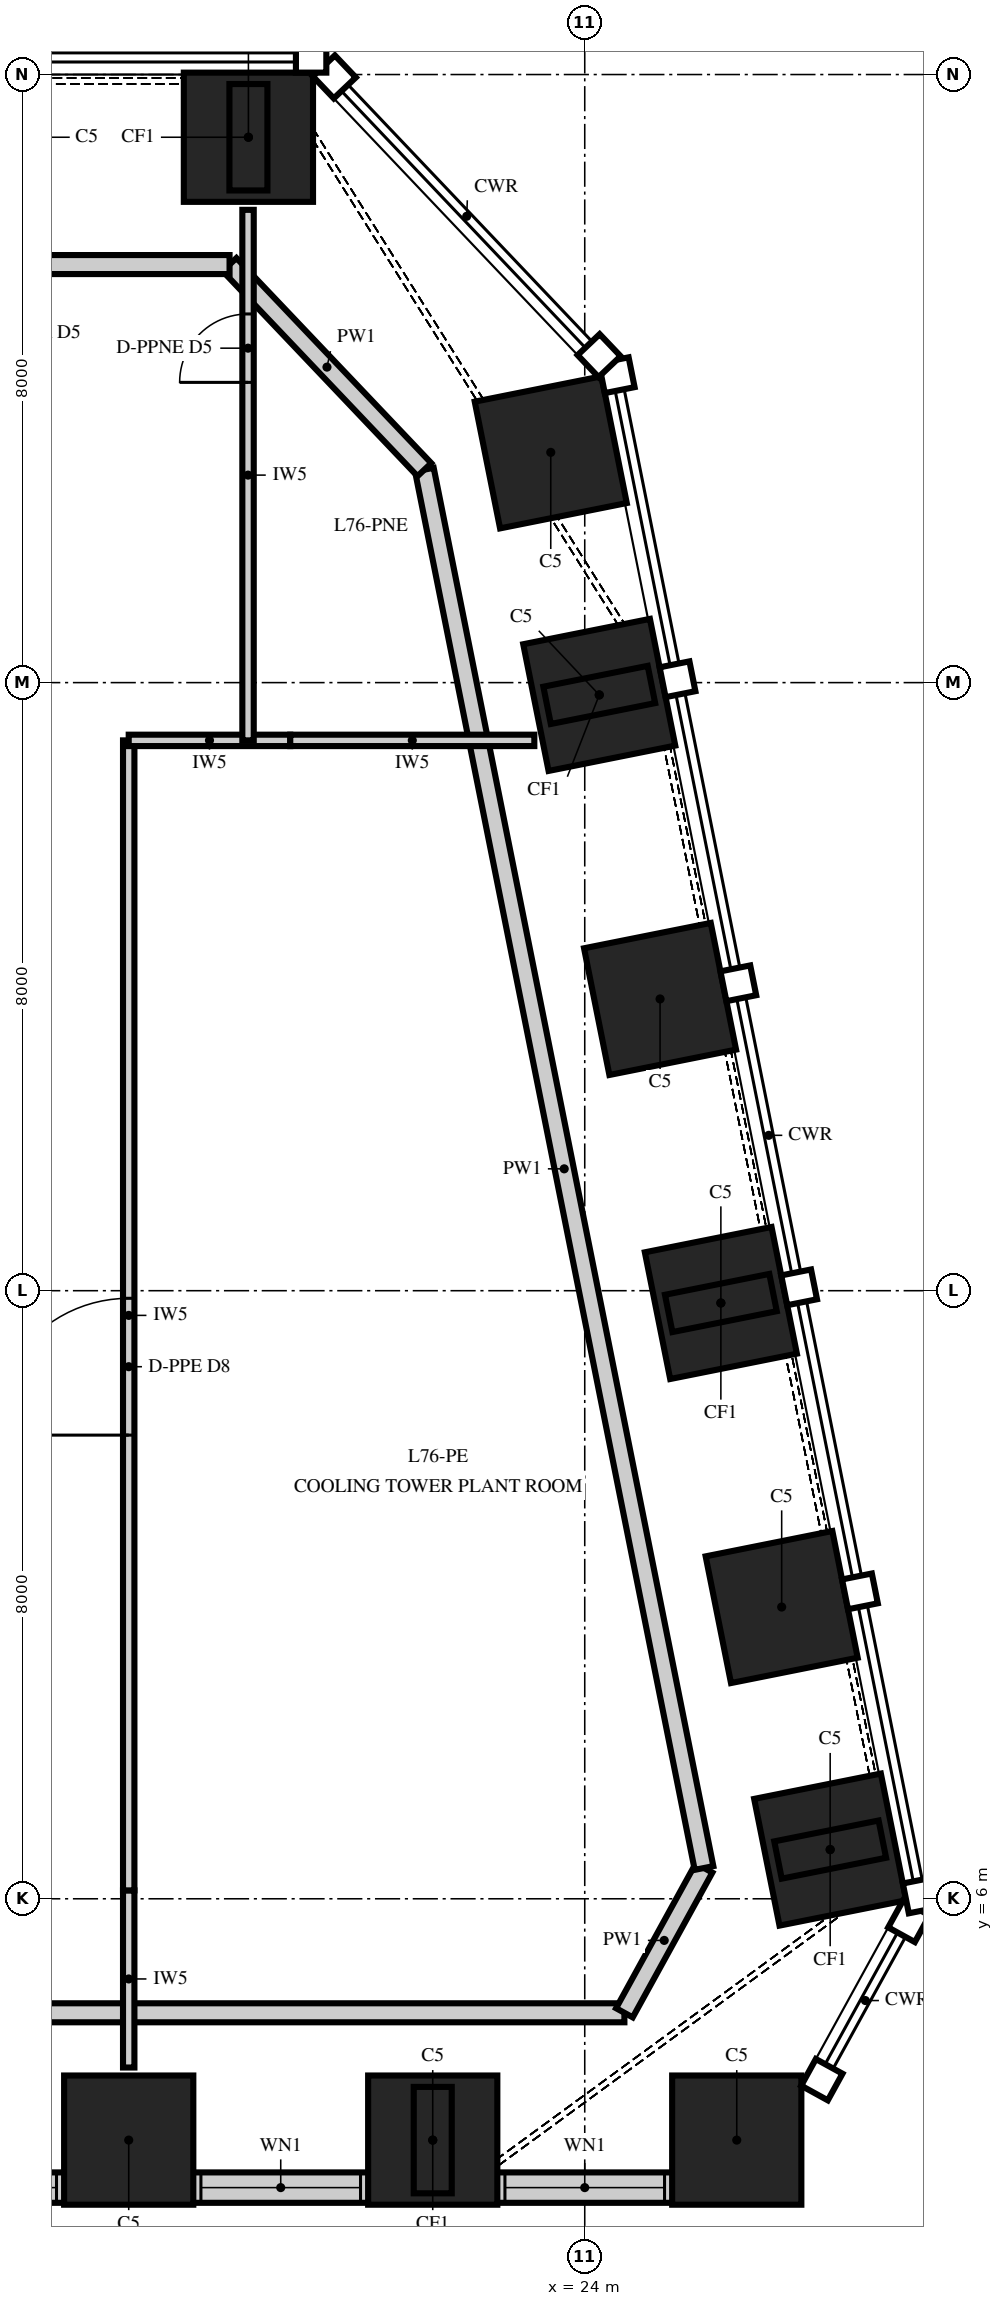
"""IFC4 building model, lengths in metres.
Left out: names, types, materials, properties, quantities, classifications, styles, units other than length and angle.
Written with IfcOpenShell. Run it as: python <this file> out.ifc"""

import sys

from ifc_helpers import new_model, si_unit, direction, frame, frame_2d, origin, origin_2d, place, context, subcontext, project, spatial, rectangle, hollow_rectangle, extrude, element, fill, save


model = new_model("IFC4")
c1 = context("Model", 3, precision=1e-05, world=origin(), true_north=direction((0.0, 1.0)))
c2 = subcontext(c1, "Body", "Model", "MODEL_VIEW")
j1 = project(units=[si_unit("LENGTHUNIT", "METRE"), si_unit("PLANEANGLEUNIT", "RADIAN")], contexts=[c1])
p1 = place(None, origin())
s1 = spatial("IfcSite", under=j1, at=p1, CompositionType="ELEMENT")
p2 = place(p1, origin())
s2 = spatial("IfcBuilding", under=s1, at=p2, CompositionType="ELEMENT")
p3 = place(p2, frame((0.0, 0.0, 324.0)))
s3 = spatial("IfcBuildingStorey", under=s2, at=p3, CompositionType="ELEMENT", Elevation=324.0)
for number, where, z_axis, x_axis in (
    (1, (18.0, 2.825, 0.0), (0.0, 0.0, 1.0), (1.0, 0.0, 0.0)),
    (2, (22.0, 2.825, 0.0), (0.0, 0.0, 1.0), (1.0, 0.0, 0.0)),
    (3, (26.0, 2.825, 0.0), (0.0, 0.0, 1.0), (1.0, 0.0, 0.0)),
    (4, (27.229, 6.647, 0.0), (0.0, 0.0, 1.0), (-0.196, 0.981, 0.0)),
    (5, (26.591, 9.838, 0.0), (0.0, 0.0, 1.0), (-0.196, 0.981, 0.0)),
    (6, (25.791, 13.838, 0.0), (0.0, 0.0, 1.0), (-0.196, 0.981, 0.0)),
    (7, (24.991, 17.838, 0.0), (0.0, 0.0, 1.0), (-0.196, 0.981, 0.0)),
    (8, (24.191, 21.838, 0.0), (0.0, 0.0, 1.0), (-0.196, 0.981, 0.0)),
    (9, (23.553, 25.029, 0.0), (0.0, 0.0, 1.0), (-0.196, 0.981, 0.0)),
    (10, (19.575, 29.175, 0.0), (0.0, 0.0, 1.0), (-1.0, 0.0, 0.0)),
):
    element("IfcColumn", number, at=place(p3, frame(where, z_axis=z_axis, x_axis=x_axis)), inside=s3, PredefinedType="COLUMN", context=c2, shape_type="SweptSolid", body=[
        extrude(rectangle(XDim=1.7, YDim=1.7, at=origin_2d()), origin(), (0.0, 0.0, 1.0), 6.0),
    ])
for number, where, z_axis, x_axis in (
    (11, (22.0, 2.825, 6.0), (0.0, 0.0, 1.0), (1.0, 0.0, 0.0)),
    (12, (27.229, 6.647, 6.0), (0.0, 0.0, 1.0), (-0.196, 0.981, 0.0)),
    (13, (25.791, 13.838, 6.0), (0.0, 0.0, 1.0), (-0.196, 0.981, 0.0)),
    (14, (24.191, 21.838, 6.0), (0.0, 0.0, 1.0), (-0.196, 0.981, 0.0)),
    (15, (19.575, 29.175, 6.0), (0.0, 0.0, 1.0), (-1.0, 0.0, 0.0)),
):
    element("IfcColumn", number, at=place(p3, frame(where, z_axis=z_axis, x_axis=x_axis)), inside=s3, PredefinedType="COLUMN", context=c2, shape_type="SweptSolid", body=[
        extrude(hollow_rectangle(XDim=0.5, YDim=1.4, WallThickness=0.04, at=origin_2d()), origin(), (0.0, 0.0, 1.0), 24.0),
    ])
p4 = place(p3, frame((-26.0, 2.2, 0.0), z_axis=(0.0, 0.0, 1.0), x_axis=(1.0, 0.0, 0.0)))
e16 = element("IfcWall", 16, at=p4, inside=s3, PredefinedType="SOLIDWALL", context=c2, shape_type="SweptSolid", body=[
    extrude(rectangle(XDim=52.0, YDim=0.4, at=frame_2d((26.0, 0.0))), origin(), (0.0, 0.0, 1.0), 4.0),
])
p5 = place(p4, frame((0.95, 0.0, 0.8)))
e17 = element("IfcOpeningElement", 17, at=p5, cuts=e16, PredefinedType="OPENING", context=c2, shape_type="SweptSolid", body=[
    extrude(rectangle(XDim=2.1, YDim=1.15, at=frame_2d((1.05, 0.575))), frame((0.0, 0.215, 0.0), z_axis=(0.0, -1.0, 0.0), x_axis=(1.0, 0.0, 0.0)), (0.0, 0.0, 1.0), 0.43),
])
p6 = place(p4, frame((4.95, 0.0, 0.8)))
e18 = element("IfcOpeningElement", 18, at=p6, cuts=e16, PredefinedType="OPENING", context=c2, shape_type="SweptSolid", body=[
    extrude(rectangle(XDim=2.1, YDim=1.15, at=frame_2d((1.05, 0.575))), frame((0.0, 0.215, 0.0), z_axis=(0.0, -1.0, 0.0), x_axis=(1.0, 0.0, 0.0)), (0.0, 0.0, 1.0), 0.43),
])
p7 = place(p4, frame((8.95, 0.0, 0.8)))
e19 = element("IfcOpeningElement", 19, at=p7, cuts=e16, PredefinedType="OPENING", context=c2, shape_type="SweptSolid", body=[
    extrude(rectangle(XDim=2.1, YDim=1.15, at=frame_2d((1.05, 0.575))), frame((0.0, 0.215, 0.0), z_axis=(0.0, -1.0, 0.0), x_axis=(1.0, 0.0, 0.0)), (0.0, 0.0, 1.0), 0.43),
])
p8 = place(p4, frame((12.95, 0.0, 0.8)))
e20 = element("IfcOpeningElement", 20, at=p8, cuts=e16, PredefinedType="OPENING", context=c2, shape_type="SweptSolid", body=[
    extrude(rectangle(XDim=2.1, YDim=1.15, at=frame_2d((1.05, 0.575))), frame((0.0, 0.215, 0.0), z_axis=(0.0, -1.0, 0.0), x_axis=(1.0, 0.0, 0.0)), (0.0, 0.0, 1.0), 0.43),
])
p9 = place(p4, frame((16.95, 0.0, 0.8)))
e21 = element("IfcOpeningElement", 21, at=p9, cuts=e16, PredefinedType="OPENING", context=c2, shape_type="SweptSolid", body=[
    extrude(rectangle(XDim=2.1, YDim=1.15, at=frame_2d((1.05, 0.575))), frame((0.0, 0.215, 0.0), z_axis=(0.0, -1.0, 0.0), x_axis=(1.0, 0.0, 0.0)), (0.0, 0.0, 1.0), 0.43),
])
p10 = place(p4, frame((20.95, 0.0, 0.8)))
e22 = element("IfcOpeningElement", 22, at=p10, cuts=e16, PredefinedType="OPENING", context=c2, shape_type="SweptSolid", body=[
    extrude(rectangle(XDim=2.1, YDim=1.15, at=frame_2d((1.05, 0.575))), frame((0.0, 0.215, 0.0), z_axis=(0.0, -1.0, 0.0), x_axis=(1.0, 0.0, 0.0)), (0.0, 0.0, 1.0), 0.43),
])
p11 = place(p4, frame((24.95, 0.0, 0.8)))
e23 = element("IfcOpeningElement", 23, at=p11, cuts=e16, PredefinedType="OPENING", context=c2, shape_type="SweptSolid", body=[
    extrude(rectangle(XDim=2.1, YDim=1.15, at=frame_2d((1.05, 0.575))), frame((0.0, 0.215, 0.0), z_axis=(0.0, -1.0, 0.0), x_axis=(1.0, 0.0, 0.0)), (0.0, 0.0, 1.0), 0.43),
])
p12 = place(p4, frame((28.95, 0.0, 0.8)))
e24 = element("IfcOpeningElement", 24, at=p12, cuts=e16, PredefinedType="OPENING", context=c2, shape_type="SweptSolid", body=[
    extrude(rectangle(XDim=2.1, YDim=1.15, at=frame_2d((1.05, 0.575))), frame((0.0, 0.215, 0.0), z_axis=(0.0, -1.0, 0.0), x_axis=(1.0, 0.0, 0.0)), (0.0, 0.0, 1.0), 0.43),
])
p13 = place(p4, frame((32.95, 0.0, 0.8)))
e25 = element("IfcOpeningElement", 25, at=p13, cuts=e16, PredefinedType="OPENING", context=c2, shape_type="SweptSolid", body=[
    extrude(rectangle(XDim=2.1, YDim=1.15, at=frame_2d((1.05, 0.575))), frame((0.0, 0.215, 0.0), z_axis=(0.0, -1.0, 0.0), x_axis=(1.0, 0.0, 0.0)), (0.0, 0.0, 1.0), 0.43),
])
p14 = place(p4, frame((36.95, 0.0, 0.8)))
e26 = element("IfcOpeningElement", 26, at=p14, cuts=e16, PredefinedType="OPENING", context=c2, shape_type="SweptSolid", body=[
    extrude(rectangle(XDim=2.1, YDim=1.15, at=frame_2d((1.05, 0.575))), frame((0.0, 0.215, 0.0), z_axis=(0.0, -1.0, 0.0), x_axis=(1.0, 0.0, 0.0)), (0.0, 0.0, 1.0), 0.43),
])
p15 = place(p4, frame((40.95, 0.0, 0.8)))
e27 = element("IfcOpeningElement", 27, at=p15, cuts=e16, PredefinedType="OPENING", context=c2, shape_type="SweptSolid", body=[
    extrude(rectangle(XDim=2.1, YDim=1.15, at=frame_2d((1.05, 0.575))), frame((0.0, 0.215, 0.0), z_axis=(0.0, -1.0, 0.0), x_axis=(1.0, 0.0, 0.0)), (0.0, 0.0, 1.0), 0.43),
])
p16 = place(p4, frame((44.95, 0.0, 0.8)))
e28 = element("IfcOpeningElement", 28, at=p16, cuts=e16, PredefinedType="OPENING", context=c2, shape_type="SweptSolid", body=[
    extrude(rectangle(XDim=2.1, YDim=1.15, at=frame_2d((1.05, 0.575))), frame((0.0, 0.215, 0.0), z_axis=(0.0, -1.0, 0.0), x_axis=(1.0, 0.0, 0.0)), (0.0, 0.0, 1.0), 0.43),
])
p17 = place(p4, frame((48.95, 0.0, 0.8)))
e29 = element("IfcOpeningElement", 29, at=p17, cuts=e16, PredefinedType="OPENING", context=c2, shape_type="SweptSolid", body=[
    extrude(rectangle(XDim=2.1, YDim=1.15, at=frame_2d((1.05, 0.575))), frame((0.0, 0.215, 0.0), z_axis=(0.0, -1.0, 0.0), x_axis=(1.0, 0.0, 0.0)), (0.0, 0.0, 1.0), 0.43),
])
p18 = place(p3, frame((-24.522, 4.5, 6.0), z_axis=(0.0, 0.0, 1.0), x_axis=(1.0, 0.0, 0.0)))
e30 = element("IfcWall", 30, at=p18, inside=s3, PredefinedType="PARAPET", context=c2, shape_type="SweptSolid", body=[
    extrude(rectangle(XDim=49.043, YDim=0.25, at=frame_2d((24.522, 0.0))), origin(), (0.0, 0.0, 1.0), 1.1),
])
p19 = place(p3, frame((24.522, 4.5, 6.0), z_axis=(0.0, 0.0, 1.0), x_axis=(0.481996345575, 0.876173226509, 0.0)))
e31 = element("IfcWall", 31, at=p19, inside=s3, PredefinedType="PARAPET", context=c2, shape_type="SweptSolid", body=[
    extrude(rectangle(XDim=2.174, YDim=0.25, at=frame_2d((1.087, 0.0))), origin(), (0.0, 0.0, 1.0), 1.1),
])
p20 = place(p3, frame((25.57, 6.405, 6.0), z_axis=(0.0, 0.0, 1.0), x_axis=(-0.196118637634, 0.980580175188, 0.0)))
e32 = element("IfcWall", 32, at=p20, inside=s3, PredefinedType="PARAPET", context=c2, shape_type="SweptSolid", body=[
    extrude(rectangle(XDim=18.761, YDim=0.25, at=frame_2d((9.381, 0.0))), origin(), (0.0, 0.0, 1.0), 1.1),
])
p21 = place(p3, frame((21.89, 24.802, 6.0), z_axis=(0.0, 0.0, 1.0), x_axis=(-0.688770149305, 0.724979780012, 0.0)))
e33 = element("IfcWall", 33, at=p21, inside=s3, PredefinedType="PARAPET", context=c2, shape_type="SweptSolid", body=[
    extrude(rectangle(XDim=3.722, YDim=0.25, at=frame_2d((1.861, 0.0))), origin(), (0.0, 0.0, 1.0), 1.1),
])
p22 = place(p3, frame((19.327, 27.5, 6.0), z_axis=(0.0, 0.0, 1.0), x_axis=(-1.0, 0.0, 0.0)))
e34 = element("IfcWall", 34, at=p22, inside=s3, PredefinedType="PARAPET", context=c2, shape_type="SweptSolid", body=[
    extrude(rectangle(XDim=38.653, YDim=0.25, at=frame_2d((19.327, 0.0))), origin(), (0.0, 0.0, 1.0), 1.1),
])
p23 = place(p3, frame((18.0, 3.78, 0.0), z_axis=(0.0, 0.0, 1.0), x_axis=(0.0, 1.0, 0.0)))
e35 = element("IfcWall", 35, at=p23, inside=s3, PredefinedType="PARTITIONING", context=c2, shape_type="SweptSolid", body=[
    extrude(rectangle(XDim=2.33, YDim=0.15, at=frame_2d((1.165, 0.0))), origin(), (0.0, 0.0, 1.0), 5.13),
])
p24 = place(p3, frame((18.0, 6.11, 0.0), z_axis=(0.0, 0.0, 1.0), x_axis=(0.0, 1.0, 0.0)))
e36 = element("IfcWall", 36, at=p24, inside=s3, PredefinedType="PARTITIONING", context=c2, shape_type="SweptSolid", body=[
    extrude(rectangle(XDim=15.13, YDim=0.15, at=frame_2d((7.565, 0.0))), origin(), (0.0, 0.0, 1.0), 5.75),
])
p25 = place(p24, frame((5.99, 0.0, 0.0)))
e37 = element("IfcOpeningElement", 37, at=p25, cuts=e36, PredefinedType="OPENING", context=c2, shape_type="SweptSolid", body=[
    extrude(rectangle(XDim=1.8, YDim=2.4, at=frame_2d((0.9, 1.2))), frame((0.0, 0.09, 0.0), z_axis=(0.0, -1.0, 0.0), x_axis=(1.0, 0.0, 0.0)), (0.0, 0.0, 1.0), 0.18),
])
p26 = place(p3, frame((18.0, 21.24, 0.0), z_axis=(0.0, 0.0, 1.0), x_axis=(1.0, 0.0, 0.0)))
e38 = element("IfcWall", 38, at=p26, inside=s3, PredefinedType="PARTITIONING", context=c2, shape_type="SweptSolid", body=[
    extrude(rectangle(XDim=2.125, YDim=0.15, at=frame_2d((1.062, 0.0))), origin(), (0.0, 0.0, 1.0), 5.13),
])
p27 = place(p3, frame((20.125, 21.24, 0.0), z_axis=(0.0, 0.0, 1.0), x_axis=(1.0, 0.0, 0.0)))
e39 = element("IfcWall", 39, at=p27, inside=s3, PredefinedType="PARTITIONING", context=c2, shape_type="SweptSolid", body=[
    extrude(rectangle(XDim=3.211, YDim=0.15, at=frame_2d((1.606, 0.0))), origin(), (0.0, 0.0, 1.0), 5.75),
])
p28 = place(p3, frame((19.57, 21.24, 0.0), z_axis=(0.0, 0.0, 1.0), x_axis=(0.0, 1.0, 0.0)))
e40 = element("IfcWall", 40, at=p28, inside=s3, PredefinedType="PARTITIONING", context=c2, shape_type="SweptSolid", body=[
    extrude(rectangle(XDim=6.98, YDim=0.15, at=frame_2d((3.49, 0.0))), origin(), (0.0, 0.0, 1.0), 5.318),
])
p29 = place(p28, frame((4.71, 0.0, 0.0)))
e41 = element("IfcOpeningElement", 41, at=p29, cuts=e40, PredefinedType="OPENING", context=c2, shape_type="SweptSolid", body=[
    extrude(rectangle(XDim=0.9, YDim=2.1, at=frame_2d((0.45, 1.05))), frame((0.0, 0.09, 0.0), z_axis=(0.0, -1.0, 0.0), x_axis=(1.0, 0.0, 0.0)), (0.0, 0.0, 1.0), 0.18),
])
p30 = place(p15, origin())
e42 = element("IfcWindow", 42, at=p30, inside=s3, PartitioningType="SINGLE_PANEL", PredefinedType="WINDOW", context=c2, shape_type="SweptSolid", body=[
    extrude(rectangle(XDim=2.1, YDim=1.15, at=frame_2d((1.05, 0.575))), frame((0.0, 0.03, 0.0), z_axis=(0.0, -1.0, 0.0), x_axis=(1.0, 0.0, 0.0)), (0.0, 0.0, 1.0), 0.06),
])
fill(e27, e42)
p31 = place(p16, origin())
e43 = element("IfcWindow", 43, at=p31, inside=s3, PartitioningType="SINGLE_PANEL", PredefinedType="WINDOW", context=c2, shape_type="SweptSolid", body=[
    extrude(rectangle(XDim=2.1, YDim=1.15, at=frame_2d((1.05, 0.575))), frame((0.0, 0.03, 0.0), z_axis=(0.0, -1.0, 0.0), x_axis=(1.0, 0.0, 0.0)), (0.0, 0.0, 1.0), 0.06),
])
fill(e28, e43)
p32 = place(p17, origin())
e44 = element("IfcWindow", 44, at=p32, inside=s3, PartitioningType="SINGLE_PANEL", PredefinedType="WINDOW", context=c2, shape_type="SweptSolid", body=[
    extrude(rectangle(XDim=2.1, YDim=1.15, at=frame_2d((1.05, 0.575))), frame((0.0, 0.03, 0.0), z_axis=(0.0, -1.0, 0.0), x_axis=(1.0, 0.0, 0.0)), (0.0, 0.0, 1.0), 0.06),
])
fill(e29, e44)
p33 = place(p25, origin())
e45 = element("IfcDoor", 45, at=p33, inside=s3, OperationType="DOUBLE_DOOR_SINGLE_SWING", PredefinedType="DOOR", context=c2, shape_type="SweptSolid", body=[
    extrude(rectangle(XDim=1.8, YDim=2.4, at=frame_2d((0.9, 1.2))), frame((0.0, 0.075, 0.0), z_axis=(0.0, -1.0, 0.0), x_axis=(1.0, 0.0, 0.0)), (0.0, 0.0, 1.0), 0.149),
])
fill(e37, e45)
p34 = place(p29, origin())
e46 = element("IfcDoor", 46, at=p34, inside=s3, OperationType="SINGLE_SWING_LEFT", PredefinedType="DOOR", context=c2, shape_type="SweptSolid", body=[
    extrude(rectangle(XDim=0.9, YDim=2.1, at=frame_2d((0.45, 1.05))), frame((0.0, 0.075, 0.0), z_axis=(0.0, -1.0, 0.0), x_axis=(1.0, 0.0, 0.0)), (0.0, 0.0, 1.0), 0.149),
])
fill(e41, e46)
save(model, sys.argv[1])
